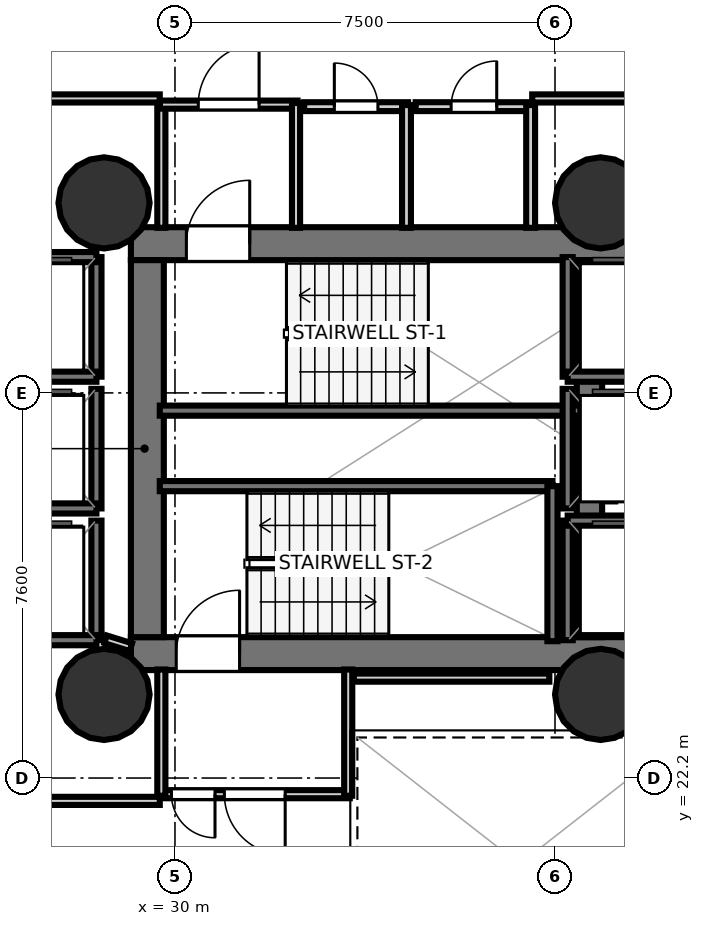
"""IFC4 building model, lengths in metres.
Left out: names, types, materials, properties, quantities, classifications, styles, units other than length and angle.
Written with IfcOpenShell. Run it as: python <this file> out.ifc"""

import sys

from ifc_helpers import new_model, si_unit, direction, frame, frame_2d, origin, origin_2d, place, context, subcontext, project, spatial, rectangle, hollow_circle, extrude, element, fill, save


model = new_model("IFC4")
c1 = context("Model", 3, precision=1e-05, world=origin(), true_north=direction((0.0, 1.0)))
c2 = subcontext(c1, "Body", "Model", "MODEL_VIEW")
j1 = project(units=[si_unit("LENGTHUNIT", "METRE"), si_unit("PLANEANGLEUNIT", "RADIAN")], contexts=[c1])
p1 = place(None, origin())
s1 = spatial("IfcSite", under=j1, at=p1, CompositionType="ELEMENT")
p2 = place(p1, origin())
s2 = spatial("IfcBuilding", under=s1, at=p2, CompositionType="ELEMENT")
p3 = place(p2, frame((0.0, 0.0, 33.1)))
s3 = spatial("IfcBuildingStorey", under=s2, at=p3, CompositionType="ELEMENT", Elevation=33.1)
p4 = place(p3, frame((29.13, 32.745, 0.0), z_axis=(0.0, 0.0, 1.0), x_axis=(1.0, 0.0, 0.0)))
e1 = element("IfcWall", 1, at=p4, inside=s3, PredefinedType="SHEAR", context=c2, shape_type="SweptSolid", body=[
    extrude(rectangle(XDim=10.72, YDim=0.65, at=frame_2d((5.36, 0.0))), origin(), (0.0, 0.0, 1.0), 3.52),
])
p5 = place(p4, frame((1.095, 0.0, 0.0)))
e2 = element("IfcOpeningElement", 2, at=p5, cuts=e1, PredefinedType="OPENING", context=c2, shape_type="SweptSolid", body=[
    extrude(rectangle(XDim=1.25, YDim=2.15, at=frame_2d((0.625, 1.075))), frame((0.0, 0.335, 0.0), z_axis=(0.0, -1.0, 0.0), x_axis=(1.0, 0.0, 0.0)), (0.0, 0.0, 1.0), 0.67),
])
p6 = place(p3, frame((29.13, 24.655, 0.0), z_axis=(0.0, 0.0, 1.0), x_axis=(1.0, 0.0, 0.0)))
e3 = element("IfcWall", 3, at=p6, inside=s3, PredefinedType="SHEAR", context=c2, shape_type="SweptSolid", body=[
    extrude(rectangle(XDim=10.72, YDim=0.65, at=frame_2d((5.36, 0.0))), origin(), (0.0, 0.0, 1.0), 3.52),
])
p7 = place(p6, frame((0.895, 0.0, 0.0)))
e4 = element("IfcOpeningElement", 4, at=p7, cuts=e3, PredefinedType="OPENING", context=c2, shape_type="SweptSolid", body=[
    extrude(rectangle(XDim=1.25, YDim=2.15, at=frame_2d((0.625, 1.075))), frame((0.0, 0.335, 0.0), z_axis=(0.0, -1.0, 0.0), x_axis=(1.0, 0.0, 0.0)), (0.0, 0.0, 1.0), 0.67),
])
p8 = place(p3, frame((29.455, 24.98, 0.0), z_axis=(0.0, 0.0, 1.0), x_axis=(0.0, 1.0, 0.0)))
e5 = element("IfcWall", 5, at=p8, inside=s3, PredefinedType="SHEAR", context=c2, shape_type="SweptSolid", body=[
    extrude(rectangle(XDim=7.44, YDim=0.65, at=frame_2d((3.72, 0.0))), origin(), (0.0, 0.0, 1.0), 3.52),
])
p9 = place(p3, frame((38.18, 24.98, 0.0), z_axis=(0.0, 0.0, 1.0), x_axis=(0.0, 1.0, 0.0)))
e6 = element("IfcWall", 6, at=p9, inside=s3, PredefinedType="SHEAR", context=c2, shape_type="SweptSolid", body=[
    extrude(rectangle(XDim=7.44, YDim=0.5, at=frame_2d((3.72, 0.0))), origin(), (0.0, 0.0, 1.0), 3.52),
])
for number, where, z_axis, x_axis in (
    (7, (28.6, 33.55, 0.0), (0.0, 0.0, 1.0), (1.0, 0.0, 0.0)),
    (8, (28.6, 23.85, 0.0), (0.0, 0.0, 1.0), (1.0, 0.0, 0.0)),
    (9, (38.4, 33.55, 0.0), (0.0, 0.0, 1.0), (1.0, 0.0, 0.0)),
    (10, (38.4, 23.85, 0.0), (0.0, 0.0, 1.0), (1.0, 0.0, 0.0)),
):
    element("IfcColumn", number, at=place(p3, frame(where, z_axis=z_axis, x_axis=x_axis)), inside=s3, PredefinedType="COLUMN", context=c2, shape_type="SweptSolid", body=[
        extrude(hollow_circle(Radius=0.9, WallThickness=0.045, at=origin_2d()), origin(), (0.0, 0.0, 1.0), 3.7),
    ])
p10 = place(p3, frame((29.7, 29.45, 0.0), z_axis=(0.0, 0.0, 1.0), x_axis=(1.0, 0.0, 0.0)))
e11 = element("IfcWall", 11, at=p10, inside=s3, PredefinedType="SOLIDWALL", context=c2, shape_type="SweptSolid", body=[
    extrude(rectangle(XDim=8.3, YDim=0.2, at=frame_2d((4.15, 0.0))), origin(), (0.0, 0.0, 1.0), 3.52),
])
p11 = place(p3, frame((29.7, 27.96, 0.0), z_axis=(0.0, 0.0, 1.0), x_axis=(1.0, 0.0, 0.0)))
e12 = element("IfcWall", 12, at=p11, inside=s3, PredefinedType="SOLIDWALL", context=c2, shape_type="SweptSolid", body=[
    extrude(rectangle(XDim=7.75, YDim=0.2, at=frame_2d((3.875, 0.0))), origin(), (0.0, 0.0, 1.0), 3.52),
])
p12 = place(p3, frame((37.45, 24.9, 0.0), z_axis=(0.0, 0.0, 1.0), x_axis=(0.0, 1.0, 0.0)))
e13 = element("IfcWall", 13, at=p12, inside=s3, PredefinedType="SOLIDWALL", context=c2, shape_type="SweptSolid", body=[
    extrude(rectangle(XDim=3.06, YDim=0.2, at=frame_2d((1.53, 0.0))), origin(), (0.0, 0.0, 1.0), 3.52),
])
p13 = place(p3, frame((37.75, 30.12, 0.0), z_axis=(0.0, 0.0, 1.0), x_axis=(0.0, 1.0, 0.0)))
e14 = element("IfcWall", 14, at=p13, inside=s3, PredefinedType="SOLIDWALL", context=c2, shape_type="SweptSolid", body=[
    extrude(rectangle(XDim=2.36, YDim=0.2, at=frame_2d((1.18, 0.0))), origin(), (0.0, 0.0, 1.0), 3.52),
])
p14 = place(p3, frame((37.75, 30.12, 0.0), z_axis=(0.0, 0.0, 1.0), x_axis=(1.0, 0.0, 0.0)))
e15 = element("IfcWall", 15, at=p14, inside=s3, PredefinedType="SOLIDWALL", context=c2, shape_type="SweptSolid", body=[
    extrude(rectangle(XDim=2.1, YDim=0.2, at=frame_2d((1.05, 0.0))), origin(), (0.0, 0.0, 1.0), 3.52),
])
p15 = place(p3, frame((37.75, 24.92, 0.0), z_axis=(0.0, 0.0, 1.0), x_axis=(0.0, 1.0, 0.0)))
e16 = element("IfcWall", 16, at=p15, inside=s3, PredefinedType="SOLIDWALL", context=c2, shape_type="SweptSolid", body=[
    extrude(rectangle(XDim=2.36, YDim=0.2, at=frame_2d((1.18, 0.0))), origin(), (0.0, 0.0, 1.0), 3.52),
])
p16 = place(p3, frame((37.75, 27.28, 0.0), z_axis=(0.0, 0.0, 1.0), x_axis=(1.0, 0.0, 0.0)))
e17 = element("IfcWall", 17, at=p16, inside=s3, PredefinedType="SOLIDWALL", context=c2, shape_type="SweptSolid", body=[
    extrude(rectangle(XDim=2.1, YDim=0.2, at=frame_2d((1.05, 0.0))), origin(), (0.0, 0.0, 1.0), 3.52),
])
p17 = place(p3, frame((28.45, 30.12, 0.0), z_axis=(0.0, 0.0, 1.0), x_axis=(0.0, 1.0, 0.0)))
e18 = element("IfcWall", 18, at=p17, inside=s3, PredefinedType="SOLIDWALL", context=c2, shape_type="SweptSolid", body=[
    extrude(rectangle(XDim=2.36, YDim=0.2, at=frame_2d((1.18, 0.0))), origin(), (0.0, 0.0, 1.0), 3.52),
])
for number, where, z_axis, x_axis in (
    (19, (26.35, 32.48, 0.0), (0.0, 0.0, 1.0), (1.0, 0.0, 0.0)),
    (20, (26.35, 30.12, 0.0), (0.0, 0.0, 1.0), (1.0, 0.0, 0.0)),
):
    element("IfcWall", number, at=place(p3, frame(where, z_axis=z_axis, x_axis=x_axis)), inside=s3, PredefinedType="SOLIDWALL", context=c2, shape_type="SweptSolid", body=[
        extrude(rectangle(XDim=2.1, YDim=0.2, at=frame_2d((1.05, 0.0))), origin(), (0.0, 0.0, 1.0), 3.52),
    ])
p18 = place(p3, frame((28.45, 27.52, 0.0), z_axis=(0.0, 0.0, 1.0), x_axis=(0.0, 1.0, 0.0)))
e21 = element("IfcWall", 21, at=p18, inside=s3, PredefinedType="SOLIDWALL", context=c2, shape_type="SweptSolid", body=[
    extrude(rectangle(XDim=2.36, YDim=0.2, at=frame_2d((1.18, 0.0))), origin(), (0.0, 0.0, 1.0), 3.52),
])
p19 = place(p3, frame((26.35, 27.52, 0.0), z_axis=(0.0, 0.0, 1.0), x_axis=(1.0, 0.0, 0.0)))
e22 = element("IfcWall", 22, at=p19, inside=s3, PredefinedType="SOLIDWALL", context=c2, shape_type="SweptSolid", body=[
    extrude(rectangle(XDim=2.1, YDim=0.2, at=frame_2d((1.05, 0.0))), origin(), (0.0, 0.0, 1.0), 3.52),
])
p20 = place(p3, frame((28.45, 24.92, 0.0), z_axis=(0.0, 0.0, 1.0), x_axis=(0.0, 1.0, 0.0)))
e23 = element("IfcWall", 23, at=p20, inside=s3, PredefinedType="SOLIDWALL", context=c2, shape_type="SweptSolid", body=[
    extrude(rectangle(XDim=2.36, YDim=0.2, at=frame_2d((1.18, 0.0))), origin(), (0.0, 0.0, 1.0), 3.52),
])
p21 = place(p3, frame((26.35, 24.92, 0.0), z_axis=(0.0, 0.0, 1.0), x_axis=(1.0, 0.0, 0.0)))
e24 = element("IfcWall", 24, at=p21, inside=s3, PredefinedType="SOLIDWALL", context=c2, shape_type="SweptSolid", body=[
    extrude(rectangle(XDim=2.1, YDim=0.2, at=frame_2d((1.05, 0.0))), origin(), (0.0, 0.0, 1.0), 3.52),
])
p22 = place(p3, frame((37.75, 27.52, 0.0), z_axis=(0.0, 0.0, 1.0), x_axis=(0.0, 1.0, 0.0)))
e25 = element("IfcWall", 25, at=p22, inside=s3, PredefinedType="SOLIDWALL", context=c2, shape_type="SweptSolid", body=[
    extrude(rectangle(XDim=2.36, YDim=0.2, at=frame_2d((1.18, 0.0))), origin(), (0.0, 0.0, 1.0), 3.52),
])
p23 = place(p3, frame((29.731, 33.058, 0.0), z_axis=(0.0, 0.0, 1.0), x_axis=(0.0, 1.0, 0.0)))
e26 = element("IfcWall", 26, at=p23, inside=s3, PredefinedType="PARTITIONING", context=c2, shape_type="SweptSolid", body=[
    extrude(rectangle(XDim=2.462, YDim=0.16, at=frame_2d((1.231, 0.0))), origin(), (0.0, 0.0, 1.0), 2.84),
])
p24 = place(p3, frame((29.7, 35.489, 0.0), z_axis=(0.0, 0.0, 1.0), x_axis=(1.0, 0.0, 0.0)))
e27 = element("IfcWall", 27, at=p24, inside=s3, PredefinedType="PARTITIONING", context=c2, shape_type="SweptSolid", body=[
    extrude(rectangle(XDim=2.72, YDim=0.16, at=frame_2d((1.36, 0.0))), origin(), (0.0, 0.0, 1.0), 2.84),
])
p25 = place(p24, frame((0.76, 0.0, 0.0)))
e28 = element("IfcOpeningElement", 28, at=p25, cuts=e27, PredefinedType="OPENING", context=c2, shape_type="SweptSolid", body=[
    extrude(rectangle(XDim=1.2, YDim=2.15, at=frame_2d((0.6, 1.075))), frame((0.0, 0.09, 0.0), z_axis=(0.0, -1.0, 0.0), x_axis=(1.0, 0.0, 0.0)), (0.0, 0.0, 1.0), 0.18),
])
p26 = place(p3, frame((32.389, 35.52, 0.0), z_axis=(0.0, 0.0, 1.0), x_axis=(0.0, -1.0, 0.0)))
e29 = element("IfcWall", 29, at=p26, inside=s3, PredefinedType="PARTITIONING", context=c2, shape_type="SweptSolid", body=[
    extrude(rectangle(XDim=2.462, YDim=0.16, at=frame_2d((1.231, 0.0))), origin(), (0.0, 0.0, 1.0), 2.84),
])
p27 = place(p3, frame((33.45, 21.881, 0.0), z_axis=(0.0, 0.0, 1.0), x_axis=(-1.0, 0.0, 0.0)))
e30 = element("IfcWall", 30, at=p27, inside=s3, PredefinedType="PARTITIONING", context=c2, shape_type="SweptSolid", body=[
    extrude(rectangle(XDim=3.75, YDim=0.16, at=frame_2d((1.875, 0.0))), origin(), (0.0, 0.0, 1.0), 2.84),
])
p28 = place(p27, frame((1.275, 0.0, 0.0)))
e31 = element("IfcOpeningElement", 31, at=p28, cuts=e30, PredefinedType="OPENING", context=c2, shape_type="SweptSolid", body=[
    extrude(rectangle(XDim=1.2, YDim=2.15, at=frame_2d((0.6, 1.075))), frame((0.0, 0.09, 0.0), z_axis=(0.0, -1.0, 0.0), x_axis=(1.0, 0.0, 0.0)), (0.0, 0.0, 1.0), 0.18),
])
p29 = place(p27, frame((2.66, 0.0, 0.0)))
e32 = element("IfcOpeningElement", 32, at=p29, cuts=e30, PredefinedType="OPENING", context=c2, shape_type="SweptSolid", body=[
    extrude(rectangle(XDim=0.86, YDim=2.05, at=frame_2d((0.43, 1.025))), frame((0.0, 0.09, 0.0), z_axis=(0.0, -1.0, 0.0), x_axis=(1.0, 0.0, 0.0)), (0.0, 0.0, 1.0), 0.18),
])
for number, where, z_axis, x_axis in (
    (33, (29.731, 21.85, 0.0), (0.0, 0.0, 1.0), (0.0, 1.0, 0.0)),
    (34, (33.419, 24.342, 0.0), (0.0, 0.0, 1.0), (0.0, -1.0, 0.0)),
):
    element("IfcWall", number, at=place(p3, frame(where, z_axis=z_axis, x_axis=x_axis)), inside=s3, PredefinedType="PARTITIONING", context=c2, shape_type="SweptSolid", body=[
        extrude(rectangle(XDim=2.492, YDim=0.16, at=frame_2d((1.246, 0.0))), origin(), (0.0, 0.0, 1.0), 2.84),
    ])
p30 = place(p3, frame((32.55, 35.449, 0.0), z_axis=(0.0, 0.0, 1.0), x_axis=(1.0, 0.0, 0.0)))
e35 = element("IfcWall", 35, at=p30, inside=s3, PredefinedType="PLUMBINGWALL", context=c2, shape_type="SweptSolid", body=[
    extrude(rectangle(XDim=2.05, YDim=0.175, at=frame_2d((1.025, 0.0))), origin(), (0.0, 0.0, 1.0), 2.84),
])
p31 = place(p30, frame((0.595, 0.0, 0.0)))
e36 = element("IfcOpeningElement", 36, at=p31, cuts=e35, PredefinedType="OPENING", context=c2, shape_type="SweptSolid", body=[
    extrude(rectangle(XDim=0.86, YDim=2.05, at=frame_2d((0.43, 1.025))), frame((0.0, 0.097, 0.0), z_axis=(0.0, -1.0, 0.0), x_axis=(1.0, 0.0, 0.0)), (0.0, 0.0, 1.0), 0.195),
])
p32 = place(p3, frame((34.569, 35.48, 0.0), z_axis=(0.0, 0.0, 1.0), x_axis=(0.0, -1.0, 0.0)))
e37 = element("IfcWall", 37, at=p32, inside=s3, PredefinedType="PLUMBINGWALL", context=c2, shape_type="SweptSolid", body=[
    extrude(rectangle(XDim=2.422, YDim=0.175, at=frame_2d((1.211, 0.0))), origin(), (0.0, 0.0, 1.0), 2.84),
])
p33 = place(p3, frame((34.75, 35.449, 0.0), z_axis=(0.0, 0.0, 1.0), x_axis=(1.0, 0.0, 0.0)))
e38 = element("IfcWall", 38, at=p33, inside=s3, PredefinedType="PLUMBINGWALL", context=c2, shape_type="SweptSolid", body=[
    extrude(rectangle(XDim=2.3, YDim=0.175, at=frame_2d((1.15, 0.0))), origin(), (0.0, 0.0, 1.0), 2.84),
])
p34 = place(p33, frame((0.7, 0.0, 0.0)))
e39 = element("IfcOpeningElement", 39, at=p34, cuts=e38, PredefinedType="OPENING", context=c2, shape_type="SweptSolid", body=[
    extrude(rectangle(XDim=0.9, YDim=2.1, at=frame_2d((0.45, 1.05))), frame((0.0, 0.097, 0.0), z_axis=(0.0, -1.0, 0.0), x_axis=(1.0, 0.0, 0.0)), (0.0, 0.0, 1.0), 0.195),
])
p35 = place(p3, frame((37.019, 35.48, 0.0), z_axis=(0.0, 0.0, 1.0), x_axis=(0.0, -1.0, 0.0)))
e40 = element("IfcWall", 40, at=p35, inside=s3, PredefinedType="PLUMBINGWALL", context=c2, shape_type="SweptSolid", body=[
    extrude(rectangle(XDim=2.422, YDim=0.175, at=frame_2d((1.211, 0.0))), origin(), (0.0, 0.0, 1.0), 2.84),
])
p36 = place(p3, frame((29.13, 24.782, 0.0), z_axis=(0.0, 0.0, 1.0), x_axis=(-0.955000482512, 0.296604245422, 0.0)))
e41 = element("IfcWall", 41, at=p36, inside=s3, PredefinedType="PARTITIONING", context=c2, shape_type="SweptSolid", body=[
    extrude(rectangle(XDim=0.524, YDim=0.16, at=frame_2d((0.262, 0.0))), origin(), (0.0, 0.0, 1.0), 2.84),
])
p37 = place(p3, frame((37.389, 24.181, 0.0), z_axis=(0.0, 0.0, 1.0), x_axis=(-1.0, 0.0, 0.0)))
e42 = element("IfcWall", 42, at=p37, inside=s3, PredefinedType="PARTITIONING", context=c2, shape_type="SweptSolid", body=[
    extrude(rectangle(XDim=3.859, YDim=0.16, at=frame_2d((1.929, 0.0))), origin(), (0.0, 0.0, 1.0), 2.84),
])
p38 = place(p3, frame((39.818, 35.611, 0.0), z_axis=(0.0, 0.0, 1.0), x_axis=(-1.0, 0.0, 0.0)))
e43 = element("IfcWall", 43, at=p38, inside=s3, PredefinedType="PARTITIONING", context=c2, shape_type="SweptSolid", body=[
    extrude(rectangle(XDim=2.768, YDim=0.16, at=frame_2d((1.384, 0.0))), origin(), (0.0, 0.0, 1.0), 2.84),
])
p39 = place(p3, frame((29.7, 35.611, 0.0), z_axis=(0.0, 0.0, 1.0), x_axis=(-1.0, 0.0, 0.0)))
e44 = element("IfcWall", 44, at=p39, inside=s3, PredefinedType="PARTITIONING", context=c2, shape_type="SweptSolid", body=[
    extrude(rectangle(XDim=3.28, YDim=0.16, at=frame_2d((1.64, 0.0))), origin(), (0.0, 0.0, 1.0), 2.798),
])
p40 = place(p3, frame((26.42, 21.749, 0.0), z_axis=(0.0, 0.0, 1.0), x_axis=(1.0, 0.0, 0.0)))
e45 = element("IfcWall", 45, at=p40, inside=s3, PredefinedType="PARTITIONING", context=c2, shape_type="SweptSolid", body=[
    extrude(rectangle(XDim=3.28, YDim=0.16, at=frame_2d((1.64, 0.0))), origin(), (0.0, 0.0, 1.0), 2.84),
])
p41 = place(p5, origin())
e46 = element("IfcDoor", 46, at=p41, inside=s3, OperationType="SINGLE_SWING_RIGHT", PredefinedType="DOOR", context=c2, shape_type="SweptSolid", body=[
    extrude(rectangle(XDim=1.25, YDim=2.15, at=frame_2d((0.625, 1.075))), frame((0.0, 0.025, 0.0), z_axis=(0.0, -1.0, 0.0), x_axis=(1.0, 0.0, 0.0)), (0.0, 0.0, 1.0), 0.05),
])
fill(e2, e46)
p42 = place(p7, origin())
e47 = element("IfcDoor", 47, at=p42, inside=s3, OperationType="SINGLE_SWING_RIGHT", PredefinedType="DOOR", context=c2, shape_type="SweptSolid", body=[
    extrude(rectangle(XDim=1.25, YDim=2.15, at=frame_2d((0.625, 1.075))), frame((0.0, 0.025, 0.0), z_axis=(0.0, -1.0, 0.0), x_axis=(1.0, 0.0, 0.0)), (0.0, 0.0, 1.0), 0.05),
])
fill(e4, e47)
p43 = place(p25, origin())
e48 = element("IfcDoor", 48, at=p43, inside=s3, OperationType="SINGLE_SWING_RIGHT", PredefinedType="DOOR", context=c2, shape_type="SweptSolid", body=[
    extrude(rectangle(XDim=1.2, YDim=2.15, at=frame_2d((0.6, 1.075))), frame((0.0, 0.025, 0.0), z_axis=(0.0, -1.0, 0.0), x_axis=(1.0, 0.0, 0.0)), (0.0, 0.0, 1.0), 0.05),
])
fill(e28, e48)
p44 = place(p28, origin())
e49 = element("IfcDoor", 49, at=p44, inside=s3, OperationType="SINGLE_SWING_LEFT", PredefinedType="DOOR", context=c2, shape_type="SweptSolid", body=[
    extrude(rectangle(XDim=1.2, YDim=2.15, at=frame_2d((0.6, 1.075))), frame((0.0, 0.025, 0.0), z_axis=(0.0, -1.0, 0.0), x_axis=(1.0, 0.0, 0.0)), (0.0, 0.0, 1.0), 0.05),
])
fill(e31, e49)
p45 = place(p31, origin())
e50 = element("IfcDoor", 50, at=p45, inside=s3, OperationType="SINGLE_SWING_LEFT", PredefinedType="DOOR", context=c2, shape_type="SweptSolid", body=[
    extrude(rectangle(XDim=0.86, YDim=2.05, at=frame_2d((0.43, 1.025))), frame((0.0, 0.025, 0.0), z_axis=(0.0, -1.0, 0.0), x_axis=(1.0, 0.0, 0.0)), (0.0, 0.0, 1.0), 0.05),
])
fill(e36, e50)
p46 = place(p34, origin())
e51 = element("IfcDoor", 51, at=p46, inside=s3, OperationType="SINGLE_SWING_RIGHT", PredefinedType="DOOR", context=c2, shape_type="SweptSolid", body=[
    extrude(rectangle(XDim=0.9, YDim=2.1, at=frame_2d((0.45, 1.05))), frame((0.0, 0.025, 0.0), z_axis=(0.0, -1.0, 0.0), x_axis=(1.0, 0.0, 0.0)), (0.0, 0.0, 1.0), 0.05),
])
fill(e39, e51)
p47 = place(p29, origin())
e52 = element("IfcDoor", 52, at=p47, inside=s3, OperationType="SINGLE_SWING_LEFT", PredefinedType="DOOR", context=c2, shape_type="SweptSolid", body=[
    extrude(rectangle(XDim=0.86, YDim=2.05, at=frame_2d((0.43, 1.025))), frame((0.0, 0.025, 0.0), z_axis=(0.0, -1.0, 0.0), x_axis=(1.0, 0.0, 0.0)), (0.0, 0.0, 1.0), 0.05),
])
fill(e32, e52)
save(model, sys.argv[1])
